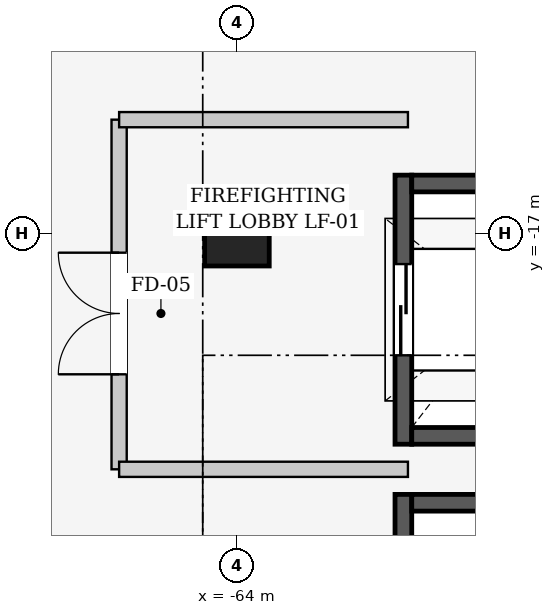
"""IFC4 building model, lengths in metres.
Left out: names, types, materials, properties, quantities, classifications, styles, units other than length and angle.
Written with IfcOpenShell. Run it as: python <this file> out.ifc"""

import sys

from ifc_helpers import new_model, si_unit, direction, frame, frame_2d, origin, origin_2d, place, context, subcontext, project, spatial, rectangle, extrude, element, fill, save


model = new_model("IFC4")
c1 = context("Model", 3, precision=1e-05, world=origin(), true_north=direction((0.0, 1.0)))
c2 = subcontext(c1, "Body", "Model", "MODEL_VIEW")
j1 = project(units=[si_unit("LENGTHUNIT", "METRE"), si_unit("PLANEANGLEUNIT", "RADIAN")], contexts=[c1])
p1 = place(None, origin())
s1 = spatial("IfcSite", under=j1, at=p1, CompositionType="ELEMENT")
p2 = place(p1, origin())
s2 = spatial("IfcBuilding", under=s1, at=p2, CompositionType="ELEMENT")
p3 = place(p2, frame((0.0, 0.0, 11.4)))
s3 = spatial("IfcBuildingStorey", under=s2, at=p3, CompositionType="ELEMENT", Elevation=11.4)
p4 = place(p3, frame((-64.0, -17.0, 0.0), z_axis=(0.0, 0.0, 1.0), x_axis=(1.0, 0.0, 0.0)))
e1 = element("IfcColumn", 1, at=p4, inside=s3, PredefinedType="COLUMN", context=c2, shape_type="SweptSolid", body=[
    extrude(rectangle(XDim=0.85, YDim=0.85, at=origin_2d()), origin(), (0.0, 0.0, 1.0), 4.8),
])
p5 = place(p3, frame((-61.81, -19.77, 0.0), z_axis=(0.0, 0.0, 1.0), x_axis=(0.0, 1.0, 0.0)))
e2 = element("IfcWall", 2, at=p5, inside=s3, PredefinedType="SHEAR", context=c2, shape_type="SweptSolid", body=[
    extrude(rectangle(XDim=3.54, YDim=0.22, at=frame_2d((1.77, 0.0))), origin(), (0.0, 0.0, 1.0), 4.8),
])
p6 = place(p5, frame((1.17, 0.0, 0.0)))
e3 = element("IfcOpeningElement", 3, at=p6, cuts=e2, PredefinedType="OPENING", context=c2, shape_type="SweptSolid", body=[
    extrude(rectangle(XDim=1.2, YDim=2.2, at=frame_2d((0.6, 1.1))), frame((0.0, 0.12, 0.0), z_axis=(0.0, -1.0, 0.0), x_axis=(1.0, 0.0, 0.0)), (0.0, 0.0, 1.0), 0.24),
])
for number, where, z_axis, x_axis in (
    (4, (-61.7, -16.34, 0.0), (0.0, 0.0, 1.0), (1.0, 0.0, 0.0)),
    (5, (-59.3, -19.66, 0.0), (0.0, 0.0, 1.0), (-1.0, 0.0, 0.0)),
):
    element("IfcWall", number, at=place(p3, frame(where, z_axis=z_axis, x_axis=x_axis)), inside=s3, PredefinedType="SHEAR", context=c2, shape_type="SweptSolid", body=[
        extrude(rectangle(XDim=2.4, YDim=0.22, at=frame_2d((1.2, 0.0))), origin(), (0.0, 0.0, 1.0), 4.8),
    ])
p7 = place(p3, frame((-61.81, -23.97, 0.0), z_axis=(0.0, 0.0, 1.0), x_axis=(0.0, 1.0, 0.0)))
e6 = element("IfcWall", 6, at=p7, inside=s3, PredefinedType="SHEAR", context=c2, shape_type="SweptSolid", body=[
    extrude(rectangle(XDim=3.54, YDim=0.22, at=frame_2d((1.77, 0.0))), origin(), (0.0, 0.0, 1.0), 4.8),
])
p8 = place(p7, frame((1.22, 0.0, 0.0)))
e7 = element("IfcOpeningElement", 7, at=p8, cuts=e6, PredefinedType="OPENING", context=c2, shape_type="SweptSolid", body=[
    extrude(rectangle(XDim=1.1, YDim=2.2, at=frame_2d((0.55, 1.1))), frame((0.0, 0.12, 0.0), z_axis=(0.0, -1.0, 0.0), x_axis=(1.0, 0.0, 0.0)), (0.0, 0.0, 1.0), 0.24),
])
p9 = place(p3, frame((-61.7, -20.54, 0.0), z_axis=(0.0, 0.0, 1.0), x_axis=(1.0, 0.0, 0.0)))
e8 = element("IfcWall", 8, at=p9, inside=s3, PredefinedType="SHEAR", context=c2, shape_type="SweptSolid", body=[
    extrude(rectangle(XDim=2.4, YDim=0.22, at=frame_2d((1.2, 0.0))), origin(), (0.0, 0.0, 1.0), 4.8),
])
p10 = place(p3, frame((-65.55, -20.1, 0.0), z_axis=(0.0, 0.0, 1.0), x_axis=(0.0, 1.0, 0.0)))
e9 = element("IfcWall", 9, at=p10, inside=s3, PredefinedType="PARTITIONING", context=c2, shape_type="SweptSolid", body=[
    extrude(rectangle(XDim=4.6, YDim=0.2, at=frame_2d((2.3, 0.0))), origin(), (0.0, 0.0, 1.0), 3.545),
])
p11 = place(p10, frame((1.25, 0.0, 0.0)))
e10 = element("IfcOpeningElement", 10, at=p11, cuts=e9, PredefinedType="OPENING", context=c2, shape_type="SweptSolid", body=[
    extrude(rectangle(XDim=1.6, YDim=2.2, at=frame_2d((0.8, 1.1))), frame((0.0, 0.11, 0.0), z_axis=(0.0, -1.0, 0.0), x_axis=(1.0, 0.0, 0.0)), (0.0, 0.0, 1.0), 0.22),
])
for number, where, z_axis, x_axis in (
    (11, (-65.55, -15.5, 0.0), (0.0, 0.0, 1.0), (1.0, 0.0, 0.0)),
    (12, (-61.75, -20.1, 0.0), (0.0, 0.0, 1.0), (-1.0, 0.0, 0.0)),
):
    element("IfcWall", number, at=place(p3, frame(where, z_axis=z_axis, x_axis=x_axis)), inside=s3, PredefinedType="PARTITIONING", context=c2, shape_type="SweptSolid", body=[
        extrude(rectangle(XDim=3.8, YDim=0.2, at=frame_2d((1.9, 0.0))), origin(), (0.0, 0.0, 1.0), 3.845),
    ])
p12 = place(p6, origin())
e13 = element("IfcDoor", 13, at=p12, inside=s3, OperationType="SLIDING_TO_LEFT", PredefinedType="DOOR", context=c2, shape_type="SweptSolid", body=[
    extrude(rectangle(XDim=1.2, YDim=2.2, at=frame_2d((0.6, 1.1))), frame((0.0, 0.025, 0.0), z_axis=(0.0, -1.0, 0.0), x_axis=(1.0, 0.0, 0.0)), (0.0, 0.0, 1.0), 0.05),
])
fill(e3, e13)
p13 = place(p11, origin())
e14 = element("IfcDoor", 14, at=p13, inside=s3, OperationType="DOUBLE_DOOR_SINGLE_SWING", PredefinedType="DOOR", context=c2, shape_type="SweptSolid", body=[
    extrude(rectangle(XDim=1.6, YDim=2.2, at=frame_2d((0.8, 1.1))), frame((0.0, 0.025, 0.0), z_axis=(0.0, -1.0, 0.0), x_axis=(1.0, 0.0, 0.0)), (0.0, 0.0, 1.0), 0.05),
])
fill(e10, e14)
save(model, sys.argv[1])
